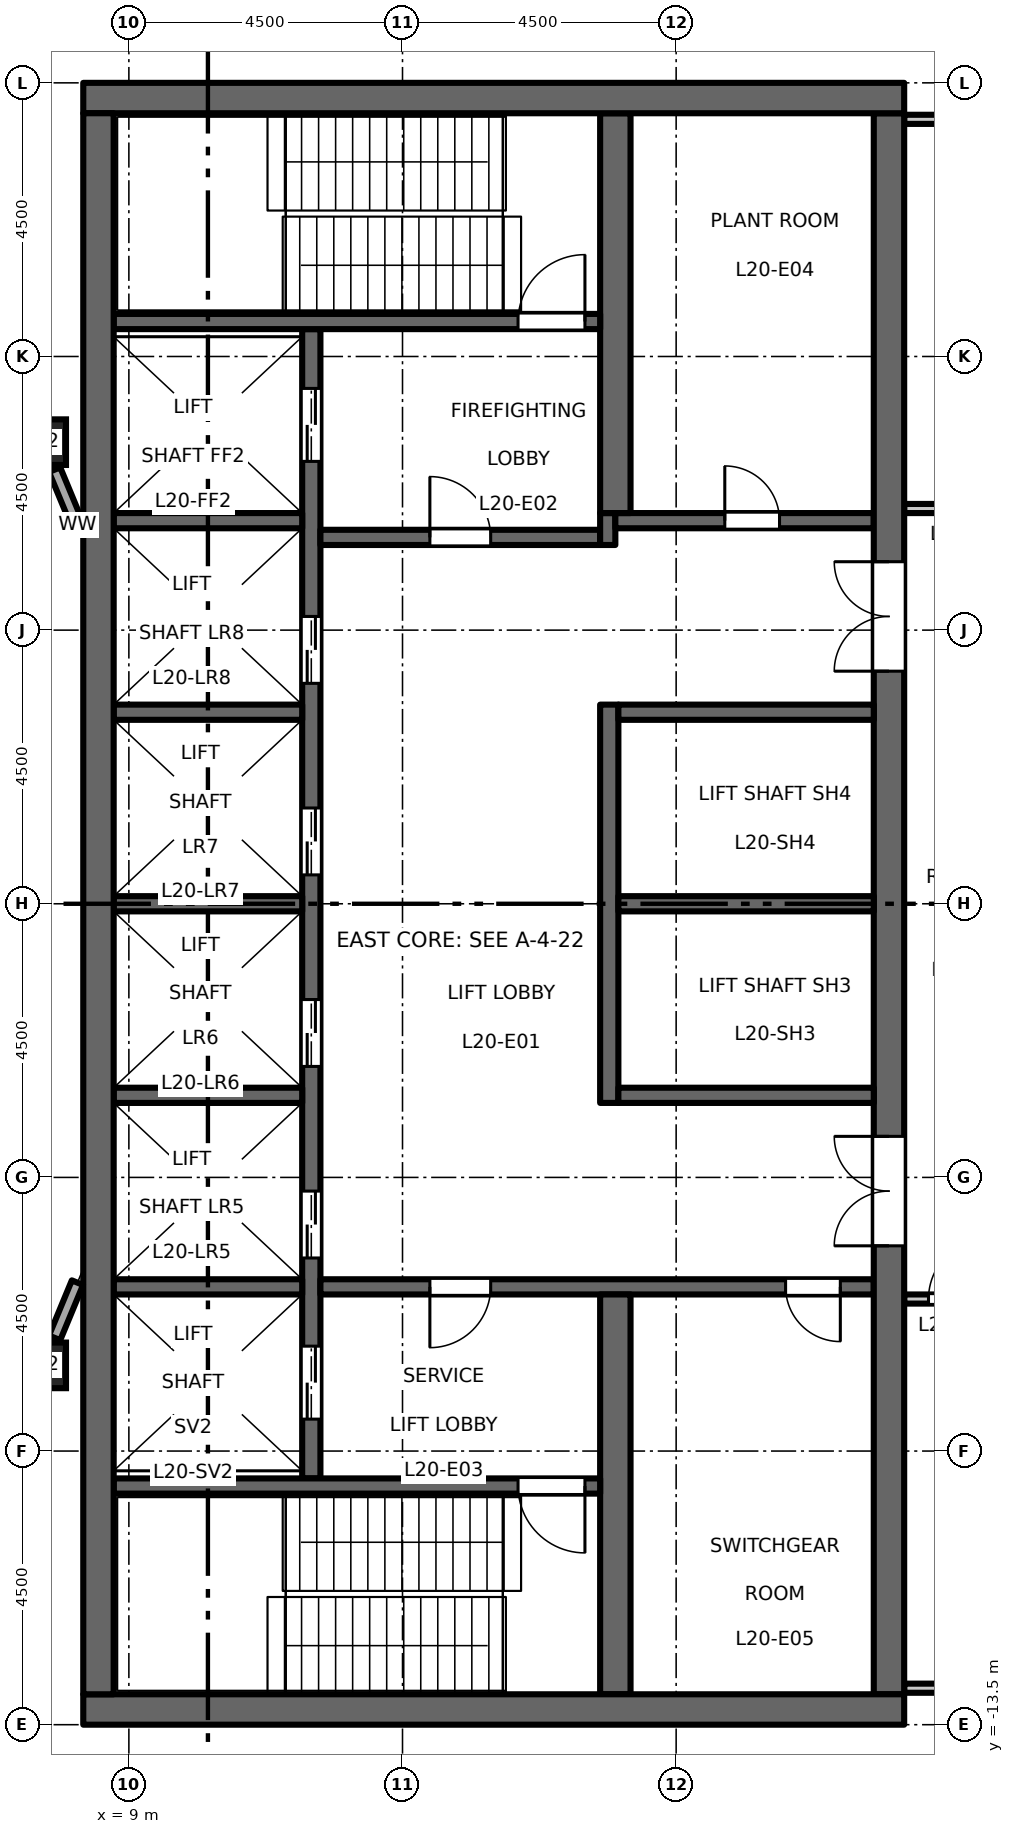
"""IFC4 building model, lengths in metres.
Left out: names, types, materials, properties, quantities, classifications, styles, units other than length and angle.
Written with IfcOpenShell. Run it as: python <this file> out.ifc"""

import sys

from ifc_helpers import new_model, si_unit, direction, frame, frame_2d, origin, origin_2d, place, context, subcontext, project, spatial, rectangle, hollow_rectangle, extrude, element, fill, save


model = new_model("IFC4")
c1 = context("Model", 3, precision=1e-05, world=origin(), true_north=direction((0.0, 1.0)))
c2 = subcontext(c1, "Body", "Model", "MODEL_VIEW")
j1 = project(units=[si_unit("LENGTHUNIT", "METRE"), si_unit("PLANEANGLEUNIT", "RADIAN")], contexts=[c1])
p1 = place(None, origin())
s1 = spatial("IfcSite", under=j1, at=p1, CompositionType="ELEMENT")
p2 = place(p1, origin())
s2 = spatial("IfcBuilding", under=s1, at=p2, CompositionType="ELEMENT")
p3 = place(p2, frame((0.0, 0.0, 94.2)))
s3 = spatial("IfcBuildingStorey", under=s2, at=p3, CompositionType="ELEMENT", Elevation=94.2)
for number, where, z_axis, x_axis in (
    (1, (7.591, -7.591, 0.0), (0.0, 0.0, 1.0), (1.0, 0.0, 0.0)),
    (2, (7.591, 7.591, 0.0), (0.0, 0.0, 1.0), (1.0, 0.0, 0.0)),
):
    element("IfcColumn", number, at=place(p3, frame(where, z_axis=z_axis, x_axis=x_axis)), inside=s3, PredefinedType="COLUMN", context=c2, shape_type="SweptSolid", body=[
        extrude(hollow_rectangle(XDim=0.75, YDim=0.75, WallThickness=0.045, at=origin_2d()), origin(), (0.0, 0.0, 1.0), 5.0),
    ])
p4 = place(p3, frame((12.0, -9.45, 0.0), z_axis=(0.0, 0.0, 1.0), x_axis=(0.0, 1.0, 0.0)))
e3 = element("IfcWall", 3, at=p4, inside=s3, PredefinedType="SHEAR", context=c2, shape_type="SweptSolid", body=[
    extrude(rectangle(XDim=18.9, YDim=0.3, at=frame_2d((9.45, 0.0))), origin(), (0.0, 0.0, 1.0), 4.8),
])
p5 = place(p4, frame((3.625, 0.0, 0.0)))
e4 = element("IfcOpeningElement", 4, at=p5, cuts=e3, PredefinedType="OPENING", context=c2, shape_type="SweptSolid", body=[
    extrude(rectangle(XDim=1.1, YDim=2.1, at=frame_2d((0.55, 1.05))), frame((0.0, 0.16, 0.0), z_axis=(0.0, -1.0, 0.0), x_axis=(1.0, 0.0, 0.0)), (0.0, 0.0, 1.0), 0.32),
])
p6 = place(p4, frame((6.775, 0.0, 0.0)))
e5 = element("IfcOpeningElement", 5, at=p6, cuts=e3, PredefinedType="OPENING", context=c2, shape_type="SweptSolid", body=[
    extrude(rectangle(XDim=1.1, YDim=2.1, at=frame_2d((0.55, 1.05))), frame((0.0, 0.16, 0.0), z_axis=(0.0, -1.0, 0.0), x_axis=(1.0, 0.0, 0.0)), (0.0, 0.0, 1.0), 0.32),
])
p7 = place(p4, frame((9.925, 0.0, 0.0)))
e6 = element("IfcOpeningElement", 6, at=p7, cuts=e3, PredefinedType="OPENING", context=c2, shape_type="SweptSolid", body=[
    extrude(rectangle(XDim=1.1, YDim=2.1, at=frame_2d((0.55, 1.05))), frame((0.0, 0.16, 0.0), z_axis=(0.0, -1.0, 0.0), x_axis=(1.0, 0.0, 0.0)), (0.0, 0.0, 1.0), 0.32),
])
p8 = place(p4, frame((13.075, 0.0, 0.0)))
e7 = element("IfcOpeningElement", 7, at=p8, cuts=e3, PredefinedType="OPENING", context=c2, shape_type="SweptSolid", body=[
    extrude(rectangle(XDim=1.1, YDim=2.1, at=frame_2d((0.55, 1.05))), frame((0.0, 0.16, 0.0), z_axis=(0.0, -1.0, 0.0), x_axis=(1.0, 0.0, 0.0)), (0.0, 0.0, 1.0), 0.32),
])
p9 = place(p4, frame((16.725, 0.0, 0.0)))
e8 = element("IfcOpeningElement", 8, at=p9, cuts=e3, PredefinedType="OPENING", context=c2, shape_type="SweptSolid", body=[
    extrude(rectangle(XDim=1.2, YDim=2.1, at=frame_2d((0.6, 1.05))), frame((0.0, 0.16, 0.0), z_axis=(0.0, -1.0, 0.0), x_axis=(1.0, 0.0, 0.0)), (0.0, 0.0, 1.0), 0.32),
])
p10 = place(p4, frame((0.975, 0.0, 0.0)))
e9 = element("IfcOpeningElement", 9, at=p10, cuts=e3, PredefinedType="OPENING", context=c2, shape_type="SweptSolid", body=[
    extrude(rectangle(XDim=1.2, YDim=2.1, at=frame_2d((0.6, 1.05))), frame((0.0, 0.16, 0.0), z_axis=(0.0, -1.0, 0.0), x_axis=(1.0, 0.0, 0.0)), (0.0, 0.0, 1.0), 0.32),
])
p11 = place(p3, frame((12.15, 6.025, 0.0), z_axis=(0.0, 0.0, 1.0), x_axis=(1.0, 0.0, 0.0)))
e10 = element("IfcWall", 10, at=p11, inside=s3, PredefinedType="SHEAR", context=c2, shape_type="SweptSolid", body=[
    extrude(rectangle(XDim=4.6, YDim=0.25, at=frame_2d((2.3, 0.0))), origin(), (0.0, 0.0, 1.0), 4.8),
])
p12 = place(p11, frame((1.8, 0.0, 0.0)))
e11 = element("IfcOpeningElement", 11, at=p12, cuts=e10, PredefinedType="OPENING", context=c2, shape_type="SweptSolid", body=[
    extrude(rectangle(XDim=1.0, YDim=2.1, at=frame_2d((0.5, 1.05))), frame((0.0, 0.135, 0.0), z_axis=(0.0, -1.0, 0.0), x_axis=(1.0, 0.0, 0.0)), (0.0, 0.0, 1.0), 0.27),
])
p13 = place(p3, frame((16.875, 5.9, 0.0), z_axis=(0.0, 0.0, 1.0), x_axis=(0.0, 1.0, 0.0)))
e12 = element("IfcWall", 12, at=p13, inside=s3, PredefinedType="SHEAR", context=c2, shape_type="SweptSolid", body=[
    extrude(rectangle(XDim=0.525, YDim=0.25, at=frame_2d((0.263, 0.0))), origin(), (0.0, 0.0, 1.0), 4.8),
])
p14 = place(p3, frame((17.0, 6.3, 0.0), z_axis=(0.0, 0.0, 1.0), x_axis=(1.0, 0.0, 0.0)))
e13 = element("IfcWall", 13, at=p14, inside=s3, PredefinedType="SHEAR", context=c2, shape_type="SweptSolid", body=[
    extrude(rectangle(XDim=4.25, YDim=0.25, at=frame_2d((2.125, 0.0))), origin(), (0.0, 0.0, 1.0), 4.8),
])
p15 = place(p14, frame((1.8, 0.0, 0.0)))
e14 = element("IfcOpeningElement", 14, at=p15, cuts=e13, PredefinedType="OPENING", context=c2, shape_type="SweptSolid", body=[
    extrude(rectangle(XDim=0.9, YDim=2.1, at=frame_2d((0.45, 1.05))), frame((0.0, 0.135, 0.0), z_axis=(0.0, -1.0, 0.0), x_axis=(1.0, 0.0, 0.0)), (0.0, 0.0, 1.0), 0.27),
])
p16 = place(p3, frame((12.15, -6.3, 0.0), z_axis=(0.0, 0.0, 1.0), x_axis=(1.0, 0.0, 0.0)))
e15 = element("IfcWall", 15, at=p16, inside=s3, PredefinedType="SHEAR", context=c2, shape_type="SweptSolid", body=[
    extrude(rectangle(XDim=9.1, YDim=0.25, at=frame_2d((4.55, 0.0))), origin(), (0.0, 0.0, 1.0), 4.8),
])
p17 = place(p16, frame((1.8, 0.0, 0.0)))
e16 = element("IfcOpeningElement", 16, at=p17, cuts=e15, PredefinedType="OPENING", context=c2, shape_type="SweptSolid", body=[
    extrude(rectangle(XDim=1.0, YDim=2.1, at=frame_2d((0.5, 1.05))), frame((0.0, 0.135, 0.0), z_axis=(0.0, -1.0, 0.0), x_axis=(1.0, 0.0, 0.0)), (0.0, 0.0, 1.0), 0.27),
])
p18 = place(p16, frame((7.65, 0.0, 0.0)))
e17 = element("IfcOpeningElement", 17, at=p18, cuts=e15, PredefinedType="OPENING", context=c2, shape_type="SweptSolid", body=[
    extrude(rectangle(XDim=0.9, YDim=2.1, at=frame_2d((0.45, 1.05))), frame((0.0, 0.135, 0.0), z_axis=(0.0, -1.0, 0.0), x_axis=(1.0, 0.0, 0.0)), (0.0, 0.0, 1.0), 0.27),
])
p19 = place(p3, frame((21.5, -13.0, 0.0), z_axis=(0.0, 0.0, 1.0), x_axis=(0.0, 1.0, 0.0)))
e18 = element("IfcWall", 18, at=p19, inside=s3, PredefinedType="SHEAR", context=c2, shape_type="SweptSolid", body=[
    extrude(rectangle(XDim=26.0, YDim=0.5, at=frame_2d((13.0, 0.0))), origin(), (0.0, 0.0, 1.0), 4.8),
])
p20 = place(p19, frame((16.825, 0.0, 0.0)))
e19 = element("IfcOpeningElement", 19, at=p20, cuts=e18, PredefinedType="OPENING", context=c2, shape_type="SweptSolid", body=[
    extrude(rectangle(XDim=1.8, YDim=2.1, at=frame_2d((0.9, 1.05))), frame((0.0, 0.26, 0.0), z_axis=(0.0, -1.0, 0.0), x_axis=(1.0, 0.0, 0.0)), (0.0, 0.0, 1.0), 0.52),
])
p21 = place(p19, frame((7.375, 0.0, 0.0)))
e20 = element("IfcOpeningElement", 20, at=p21, cuts=e18, PredefinedType="OPENING", context=c2, shape_type="SweptSolid", body=[
    extrude(rectangle(XDim=1.8, YDim=2.1, at=frame_2d((0.9, 1.05))), frame((0.0, 0.26, 0.0), z_axis=(0.0, -1.0, 0.0), x_axis=(1.0, 0.0, 0.0)), (0.0, 0.0, 1.0), 0.52),
])
p22 = place(p3, frame((16.9, -3.275, 0.0), z_axis=(0.0, 0.0, 1.0), x_axis=(0.0, 1.0, 0.0)))
e21 = element("IfcWall", 21, at=p22, inside=s3, PredefinedType="SHEAR", context=c2, shape_type="SweptSolid", body=[
    extrude(rectangle(XDim=6.55, YDim=0.3, at=frame_2d((3.275, 0.0))), origin(), (0.0, 0.0, 1.0), 4.8),
])
for number, where, z_axis, x_axis in (
    (22, (17.05, 0.0, 0.0), (0.0, 0.0, 1.0), (1.0, 0.0, 0.0)),
    (23, (17.05, 3.15, 0.0), (0.0, 0.0, 1.0), (1.0, 0.0, 0.0)),
    (24, (17.05, -3.15, 0.0), (0.0, 0.0, 1.0), (1.0, 0.0, 0.0)),
):
    element("IfcWall", number, at=place(p3, frame(where, z_axis=z_axis, x_axis=x_axis)), inside=s3, PredefinedType="SHEAR", context=c2, shape_type="SweptSolid", body=[
        extrude(rectangle(XDim=4.2, YDim=0.25, at=frame_2d((2.1, 0.0))), origin(), (0.0, 0.0, 1.0), 4.8),
    ])
for number, where, z_axis, x_axis in (
    (25, (17.0, 6.425, 0.0), (0.0, 0.0, 1.0), (0.0, 1.0, 0.0)),
    (26, (17.0, -13.0, 0.0), (0.0, 0.0, 1.0), (0.0, 1.0, 0.0)),
):
    element("IfcWall", number, at=place(p3, frame(where, z_axis=z_axis, x_axis=x_axis)), inside=s3, PredefinedType="SHEAR", context=c2, shape_type="SweptSolid", body=[
        extrude(rectangle(XDim=6.575, YDim=0.5, at=frame_2d((3.288, 0.0))), origin(), (0.0, 0.0, 1.0), 4.8),
    ])
for number, where, z_axis, x_axis in (
    (27, (8.75, 0.0, 0.0), (0.0, 0.0, 1.0), (1.0, 0.0, 0.0)),
    (28, (8.75, 3.15, 0.0), (0.0, 0.0, 1.0), (1.0, 0.0, 0.0)),
    (29, (8.75, 6.3, 0.0), (0.0, 0.0, 1.0), (1.0, 0.0, 0.0)),
    (30, (8.75, -3.15, 0.0), (0.0, 0.0, 1.0), (1.0, 0.0, 0.0)),
    (31, (8.75, -6.3, 0.0), (0.0, 0.0, 1.0), (1.0, 0.0, 0.0)),
):
    element("IfcWall", number, at=place(p3, frame(where, z_axis=z_axis, x_axis=x_axis)), inside=s3, PredefinedType="SHEAR", context=c2, shape_type="SweptSolid", body=[
        extrude(rectangle(XDim=3.1, YDim=0.25, at=frame_2d((1.55, 0.0))), origin(), (0.0, 0.0, 1.0), 4.8),
    ])
p23 = place(p3, frame((8.75, 9.575, 0.0), z_axis=(0.0, 0.0, 1.0), x_axis=(1.0, 0.0, 0.0)))
e32 = element("IfcWall", 32, at=p23, inside=s3, PredefinedType="SHEAR", context=c2, shape_type="SweptSolid", body=[
    extrude(rectangle(XDim=8.0, YDim=0.25, at=frame_2d((4.0, 0.0))), origin(), (0.0, 0.0, 1.0), 4.8),
])
p24 = place(p23, frame((6.65, 0.0, 0.0)))
e33 = element("IfcOpeningElement", 33, at=p24, cuts=e32, PredefinedType="OPENING", context=c2, shape_type="SweptSolid", body=[
    extrude(rectangle(XDim=1.1, YDim=2.1, at=frame_2d((0.55, 1.05))), frame((0.0, 0.135, 0.0), z_axis=(0.0, -1.0, 0.0), x_axis=(1.0, 0.0, 0.0)), (0.0, 0.0, 1.0), 0.27),
])
p25 = place(p3, frame((8.75, -9.575, 0.0), z_axis=(0.0, 0.0, 1.0), x_axis=(1.0, 0.0, 0.0)))
e34 = element("IfcWall", 34, at=p25, inside=s3, PredefinedType="SHEAR", context=c2, shape_type="SweptSolid", body=[
    extrude(rectangle(XDim=8.0, YDim=0.25, at=frame_2d((4.0, 0.0))), origin(), (0.0, 0.0, 1.0), 4.8),
])
p26 = place(p25, frame((6.65, 0.0, 0.0)))
e35 = element("IfcOpeningElement", 35, at=p26, cuts=e34, PredefinedType="OPENING", context=c2, shape_type="SweptSolid", body=[
    extrude(rectangle(XDim=1.1, YDim=2.1, at=frame_2d((0.55, 1.05))), frame((0.0, 0.135, 0.0), z_axis=(0.0, -1.0, 0.0), x_axis=(1.0, 0.0, 0.0)), (0.0, 0.0, 1.0), 0.27),
])
for number, where, z_axis, x_axis in (
    (36, (8.25, 13.25, 0.0), (0.0, 0.0, 1.0), (1.0, 0.0, 0.0)),
    (37, (8.25, -13.25, 0.0), (0.0, 0.0, 1.0), (1.0, 0.0, 0.0)),
):
    element("IfcWall", number, at=place(p3, frame(where, z_axis=z_axis, x_axis=x_axis)), inside=s3, PredefinedType="SHEAR", context=c2, shape_type="SweptSolid", body=[
        extrude(rectangle(XDim=13.5, YDim=0.5, at=frame_2d((6.75, 0.0))), origin(), (0.0, 0.0, 1.0), 4.8),
    ])
p27 = place(p3, frame((8.5, -13.0, 0.0), z_axis=(0.0, 0.0, 1.0), x_axis=(0.0, 1.0, 0.0)))
e38 = element("IfcWall", 38, at=p27, inside=s3, PredefinedType="SHEAR", context=c2, shape_type="SweptSolid", body=[
    extrude(rectangle(XDim=26.0, YDim=0.5, at=frame_2d((13.0, 0.0))), origin(), (0.0, 0.0, 1.0), 4.8),
])
for number, where, z_axis, x_axis in (
    (39, (7.779, -7.138, 0.0), (0.0, 0.0, 1.0), (0.383, 0.924, 0.0)),
    (40, (8.154, 6.231, 0.0), (0.0, 0.0, 1.0), (-0.383, 0.924, 0.0)),
):
    element("IfcWall", number, at=place(p3, frame(where, z_axis=z_axis, x_axis=x_axis)), inside=s3, PredefinedType="STANDARD", context=c2, shape_type="SweptSolid", body=[
        extrude(rectangle(XDim=0.982, YDim=0.2, at=frame_2d((0.491, 0.0))), origin(), (0.0, 0.0, 1.0), 4.276),
    ])
p28 = place(p3, frame((21.75, -12.9, 0.0), z_axis=(0.0, 0.0, 1.0), x_axis=(1.0, 0.0, 0.0)))
e41 = element("IfcWall", 41, at=p28, inside=s3, PredefinedType="PARTITIONING", context=c2, shape_type="SweptSolid", body=[
    extrude(rectangle(XDim=6.975, YDim=0.15, at=frame_2d((3.488, 0.0))), origin(), (0.0, 0.0, 1.0), 4.8),
])
p29 = place(p3, frame((21.75, -6.5, 0.0), z_axis=(0.0, 0.0, 1.0), x_axis=(1.0, 0.0, 0.0)))
e42 = element("IfcWall", 42, at=p29, inside=s3, PredefinedType="PARTITIONING", context=c2, shape_type="SweptSolid", body=[
    extrude(rectangle(XDim=6.825, YDim=0.15, at=frame_2d((3.413, 0.0))), origin(), (0.0, 0.0, 1.0), 4.8),
])
p30 = place(p29, frame((0.4, 0.0, 0.0)))
e43 = element("IfcOpeningElement", 43, at=p30, cuts=e42, PredefinedType="OPENING", context=c2, shape_type="SweptSolid", body=[
    extrude(rectangle(XDim=1.0, YDim=2.1, at=frame_2d((0.5, 1.05))), frame((0.0, 0.085, 0.0), z_axis=(0.0, -1.0, 0.0), x_axis=(1.0, 0.0, 0.0)), (0.0, 0.0, 1.0), 0.17),
])
p31 = place(p3, frame((21.75, 6.5, 0.0), z_axis=(0.0, 0.0, 1.0), x_axis=(1.0, 0.0, 0.0)))
e44 = element("IfcWall", 44, at=p31, inside=s3, PredefinedType="PARTITIONING", context=c2, shape_type="SweptSolid", body=[
    extrude(rectangle(XDim=6.825, YDim=0.15, at=frame_2d((3.413, 0.0))), origin(), (0.0, 0.0, 1.0), 4.8),
])
p32 = place(p31, frame((0.6, 0.0, 0.0)))
e45 = element("IfcOpeningElement", 45, at=p32, cuts=e44, PredefinedType="OPENING", context=c2, shape_type="SweptSolid", body=[
    extrude(rectangle(XDim=1.0, YDim=2.1, at=frame_2d((0.5, 1.05))), frame((0.0, 0.085, 0.0), z_axis=(0.0, -1.0, 0.0), x_axis=(1.0, 0.0, 0.0)), (0.0, 0.0, 1.0), 0.17),
])
p33 = place(p3, frame((21.75, 12.9, 0.0), z_axis=(0.0, 0.0, 1.0), x_axis=(1.0, 0.0, 0.0)))
e46 = element("IfcWall", 46, at=p33, inside=s3, PredefinedType="PARTITIONING", context=c2, shape_type="SweptSolid", body=[
    extrude(rectangle(XDim=6.975, YDim=0.15, at=frame_2d((3.488, 0.0))), origin(), (0.0, 0.0, 1.0), 4.8),
])
p34 = place(p12, origin())
e47 = element("IfcDoor", 47, at=p34, inside=s3, OperationType="SINGLE_SWING_RIGHT", PredefinedType="DOOR", context=c2, shape_type="SweptSolid", body=[
    extrude(rectangle(XDim=1.0, YDim=2.1, at=frame_2d((0.5, 1.05))), frame((0.0, 0.025, 0.0), z_axis=(0.0, -1.0, 0.0), x_axis=(1.0, 0.0, 0.0)), (0.0, 0.0, 1.0), 0.05),
])
fill(e11, e47)
p35 = place(p17, origin())
e48 = element("IfcDoor", 48, at=p35, inside=s3, OperationType="SINGLE_SWING_LEFT", PredefinedType="DOOR", context=c2, shape_type="SweptSolid", body=[
    extrude(rectangle(XDim=1.0, YDim=2.1, at=frame_2d((0.5, 1.05))), frame((0.0, 0.025, 0.0), z_axis=(0.0, -1.0, 0.0), x_axis=(1.0, 0.0, 0.0)), (0.0, 0.0, 1.0), 0.05),
])
fill(e16, e48)
p36 = place(p24, origin())
e49 = element("IfcDoor", 49, at=p36, inside=s3, OperationType="SINGLE_SWING_LEFT", PredefinedType="DOOR", context=c2, shape_type="SweptSolid", body=[
    extrude(rectangle(XDim=1.1, YDim=2.1, at=frame_2d((0.55, 1.05))), frame((0.0, 0.025, 0.0), z_axis=(0.0, -1.0, 0.0), x_axis=(1.0, 0.0, 0.0)), (0.0, 0.0, 1.0), 0.05),
])
fill(e33, e49)
p37 = place(p26, origin())
e50 = element("IfcDoor", 50, at=p37, inside=s3, OperationType="SINGLE_SWING_RIGHT", PredefinedType="DOOR", context=c2, shape_type="SweptSolid", body=[
    extrude(rectangle(XDim=1.1, YDim=2.1, at=frame_2d((0.55, 1.05))), frame((0.0, 0.025, 0.0), z_axis=(0.0, -1.0, 0.0), x_axis=(1.0, 0.0, 0.0)), (0.0, 0.0, 1.0), 0.05),
])
fill(e35, e50)
p38 = place(p20, origin())
e51 = element("IfcDoor", 51, at=p38, inside=s3, OperationType="DOUBLE_DOOR_DOUBLE_SWING", PredefinedType="DOOR", context=c2, shape_type="SweptSolid", body=[
    extrude(rectangle(XDim=1.8, YDim=2.1, at=frame_2d((0.9, 1.05))), frame((0.0, 0.025, 0.0), z_axis=(0.0, -1.0, 0.0), x_axis=(1.0, 0.0, 0.0)), (0.0, 0.0, 1.0), 0.05),
])
fill(e19, e51)
p39 = place(p21, origin())
e52 = element("IfcDoor", 52, at=p39, inside=s3, OperationType="DOUBLE_DOOR_DOUBLE_SWING", PredefinedType="DOOR", context=c2, shape_type="SweptSolid", body=[
    extrude(rectangle(XDim=1.8, YDim=2.1, at=frame_2d((0.9, 1.05))), frame((0.0, 0.025, 0.0), z_axis=(0.0, -1.0, 0.0), x_axis=(1.0, 0.0, 0.0)), (0.0, 0.0, 1.0), 0.05),
])
fill(e20, e52)
p40 = place(p5, origin())
e53 = element("IfcDoor", 53, at=p40, inside=s3, OperationType="DOUBLE_DOOR_SLIDING", PredefinedType="DOOR", context=c2, shape_type="SweptSolid", body=[
    extrude(rectangle(XDim=1.1, YDim=2.1, at=frame_2d((0.55, 1.05))), frame((0.0, 0.025, 0.0), z_axis=(0.0, -1.0, 0.0), x_axis=(1.0, 0.0, 0.0)), (0.0, 0.0, 1.0), 0.05),
])
fill(e4, e53)
p41 = place(p6, origin())
e54 = element("IfcDoor", 54, at=p41, inside=s3, OperationType="DOUBLE_DOOR_SLIDING", PredefinedType="DOOR", context=c2, shape_type="SweptSolid", body=[
    extrude(rectangle(XDim=1.1, YDim=2.1, at=frame_2d((0.55, 1.05))), frame((0.0, 0.025, 0.0), z_axis=(0.0, -1.0, 0.0), x_axis=(1.0, 0.0, 0.0)), (0.0, 0.0, 1.0), 0.05),
])
fill(e5, e54)
p42 = place(p7, origin())
e55 = element("IfcDoor", 55, at=p42, inside=s3, OperationType="DOUBLE_DOOR_SLIDING", PredefinedType="DOOR", context=c2, shape_type="SweptSolid", body=[
    extrude(rectangle(XDim=1.1, YDim=2.1, at=frame_2d((0.55, 1.05))), frame((0.0, 0.025, 0.0), z_axis=(0.0, -1.0, 0.0), x_axis=(1.0, 0.0, 0.0)), (0.0, 0.0, 1.0), 0.05),
])
fill(e6, e55)
p43 = place(p8, origin())
e56 = element("IfcDoor", 56, at=p43, inside=s3, OperationType="DOUBLE_DOOR_SLIDING", PredefinedType="DOOR", context=c2, shape_type="SweptSolid", body=[
    extrude(rectangle(XDim=1.1, YDim=2.1, at=frame_2d((0.55, 1.05))), frame((0.0, 0.025, 0.0), z_axis=(0.0, -1.0, 0.0), x_axis=(1.0, 0.0, 0.0)), (0.0, 0.0, 1.0), 0.05),
])
fill(e7, e56)
p44 = place(p9, origin())
e57 = element("IfcDoor", 57, at=p44, inside=s3, OperationType="DOUBLE_DOOR_SLIDING", PredefinedType="DOOR", context=c2, shape_type="SweptSolid", body=[
    extrude(rectangle(XDim=1.2, YDim=2.1, at=frame_2d((0.6, 1.05))), frame((0.0, 0.025, 0.0), z_axis=(0.0, -1.0, 0.0), x_axis=(1.0, 0.0, 0.0)), (0.0, 0.0, 1.0), 0.05),
])
fill(e8, e57)
p45 = place(p10, origin())
e58 = element("IfcDoor", 58, at=p45, inside=s3, OperationType="DOUBLE_DOOR_SLIDING", PredefinedType="DOOR", context=c2, shape_type="SweptSolid", body=[
    extrude(rectangle(XDim=1.2, YDim=2.1, at=frame_2d((0.6, 1.05))), frame((0.0, 0.025, 0.0), z_axis=(0.0, -1.0, 0.0), x_axis=(1.0, 0.0, 0.0)), (0.0, 0.0, 1.0), 0.05),
])
fill(e9, e58)
p46 = place(p15, origin())
e59 = element("IfcDoor", 59, at=p46, inside=s3, OperationType="SINGLE_SWING_RIGHT", PredefinedType="DOOR", context=c2, shape_type="SweptSolid", body=[
    extrude(rectangle(XDim=0.9, YDim=2.1, at=frame_2d((0.45, 1.05))), frame((0.0, 0.025, 0.0), z_axis=(0.0, -1.0, 0.0), x_axis=(1.0, 0.0, 0.0)), (0.0, 0.0, 1.0), 0.05),
])
fill(e14, e59)
p47 = place(p18, origin())
e60 = element("IfcDoor", 60, at=p47, inside=s3, OperationType="SINGLE_SWING_RIGHT", PredefinedType="DOOR", context=c2, shape_type="SweptSolid", body=[
    extrude(rectangle(XDim=0.9, YDim=2.1, at=frame_2d((0.45, 1.05))), frame((0.0, 0.025, 0.0), z_axis=(0.0, -1.0, 0.0), x_axis=(1.0, 0.0, 0.0)), (0.0, 0.0, 1.0), 0.05),
])
fill(e17, e60)
p48 = place(p30, origin())
e61 = element("IfcDoor", 61, at=p48, inside=s3, OperationType="SINGLE_SWING_RIGHT", PredefinedType="DOOR", context=c2, shape_type="SweptSolid", body=[
    extrude(rectangle(XDim=1.0, YDim=2.1, at=frame_2d((0.5, 1.05))), frame((0.0, 0.025, 0.0), z_axis=(0.0, -1.0, 0.0), x_axis=(1.0, 0.0, 0.0)), (0.0, 0.0, 1.0), 0.05),
])
fill(e43, e61)
save(model, sys.argv[1])
